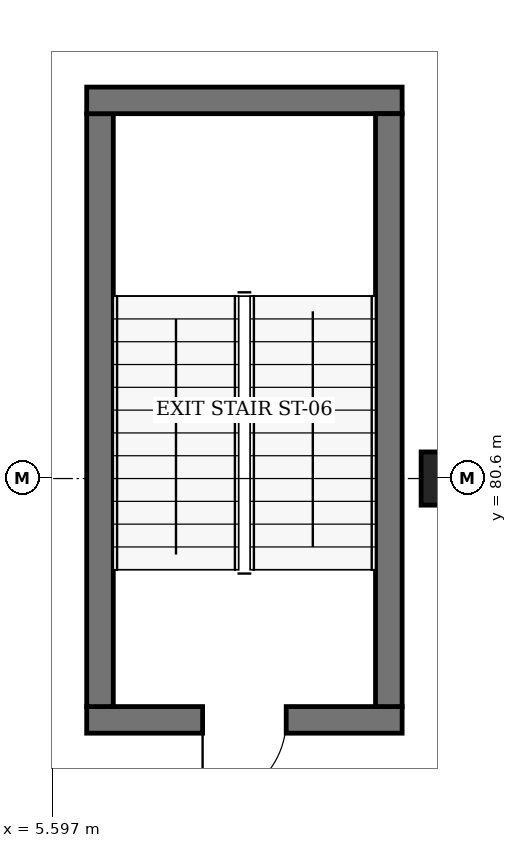
"""IFC4 building model, lengths in metres.
Left out: names, types, materials, properties, quantities, classifications, styles, units other than length and angle.
Written with IfcOpenShell. Run it as: python <this file> out.ifc"""

import sys

from ifc_helpers import new_model, si_unit, direction, frame, frame_2d, origin, origin_2d, place, context, subcontext, project, spatial, rectangle, extrude, element, fill, save


model = new_model("IFC4")
c1 = context("Model", 3, precision=1e-05, world=origin(), true_north=direction((0.0, 1.0)))
c2 = subcontext(c1, "Body", "Model", "MODEL_VIEW")
j1 = project(units=[si_unit("LENGTHUNIT", "METRE"), si_unit("PLANEANGLEUNIT", "RADIAN")], contexts=[c1])
p1 = place(None, origin())
s1 = spatial("IfcSite", under=j1, at=p1, CompositionType="ELEMENT")
p2 = place(p1, origin())
s2 = spatial("IfcBuilding", under=s1, at=p2, CompositionType="ELEMENT")
p3 = place(p2, origin())
s3 = spatial("IfcBuildingStorey", under=s2, at=p3, CompositionType="ELEMENT", Elevation=0.0)
p4 = place(p3, frame((10.8, 80.6, 0.0), z_axis=(0.0, 0.0, 1.0), x_axis=(1.0, 0.0, 0.0)))
e1 = element("IfcColumn", 1, at=p4, inside=s3, PredefinedType="COLUMN", context=c2, shape_type="SweptSolid", body=[
    extrude(rectangle(XDim=0.7, YDim=0.7, at=origin_2d()), origin(), (0.0, 0.0, 1.0), 4.8),
])
p5 = place(p3, frame((10.2, 77.425, 0.0), z_axis=(0.0, 0.0, 1.0), x_axis=(-1.0, 0.0, 0.0)))
e2 = element("IfcWall", 2, at=p5, inside=s3, PredefinedType="SOLIDWALL", context=c2, shape_type="SweptSolid", body=[
    extrude(rectangle(XDim=4.15, YDim=0.35, at=frame_2d((2.075, 0.0))), origin(), (0.0, 0.0, 1.0), 4.8),
])
p6 = place(p5, frame((1.525, 0.0, 0.0)))
e3 = element("IfcOpeningElement", 3, at=p6, cuts=e2, PredefinedType="OPENING", context=c2, shape_type="SweptSolid", body=[
    extrude(rectangle(XDim=1.1, YDim=2.15, at=frame_2d((0.55, 1.075))), frame((0.0, 0.195, 0.0), z_axis=(0.0, -1.0, 0.0), x_axis=(1.0, 0.0, 0.0)), (0.0, 0.0, 1.0), 0.39),
])
p7 = place(p3, frame((6.225, 77.6, 0.0), z_axis=(0.0, 0.0, 1.0), x_axis=(0.0, 1.0, 0.0)))
e4 = element("IfcWall", 4, at=p7, inside=s3, PredefinedType="SOLIDWALL", context=c2, shape_type="SweptSolid", body=[
    extrude(rectangle(XDim=7.8, YDim=0.35, at=frame_2d((3.9, 0.0))), origin(), (0.0, 0.0, 1.0), 4.8),
])
p8 = place(p3, frame((6.05, 85.575, 0.0), z_axis=(0.0, 0.0, 1.0), x_axis=(1.0, 0.0, 0.0)))
e5 = element("IfcWall", 5, at=p8, inside=s3, PredefinedType="SOLIDWALL", context=c2, shape_type="SweptSolid", body=[
    extrude(rectangle(XDim=4.15, YDim=0.35, at=frame_2d((2.075, 0.0))), origin(), (0.0, 0.0, 1.0), 4.8),
])
p9 = place(p3, frame((10.025, 85.4, 0.0), z_axis=(0.0, 0.0, 1.0), x_axis=(0.0, -1.0, 0.0)))
e6 = element("IfcWall", 6, at=p9, inside=s3, PredefinedType="SOLIDWALL", context=c2, shape_type="SweptSolid", body=[
    extrude(rectangle(XDim=7.8, YDim=0.35, at=frame_2d((3.9, 0.0))), origin(), (0.0, 0.0, 1.0), 4.8),
])
p10 = place(p6, origin())
e7 = element("IfcDoor", 7, at=p10, inside=s3, OperationType="SINGLE_SWING_RIGHT", PredefinedType="DOOR", context=c2, shape_type="SweptSolid", body=[
    extrude(rectangle(XDim=1.1, YDim=2.15, at=frame_2d((0.55, 1.075))), frame((0.0, 0.025, 0.0), z_axis=(0.0, -1.0, 0.0), x_axis=(1.0, 0.0, 0.0)), (0.0, 0.0, 1.0), 0.05),
])
fill(e3, e7)
save(model, sys.argv[1])
